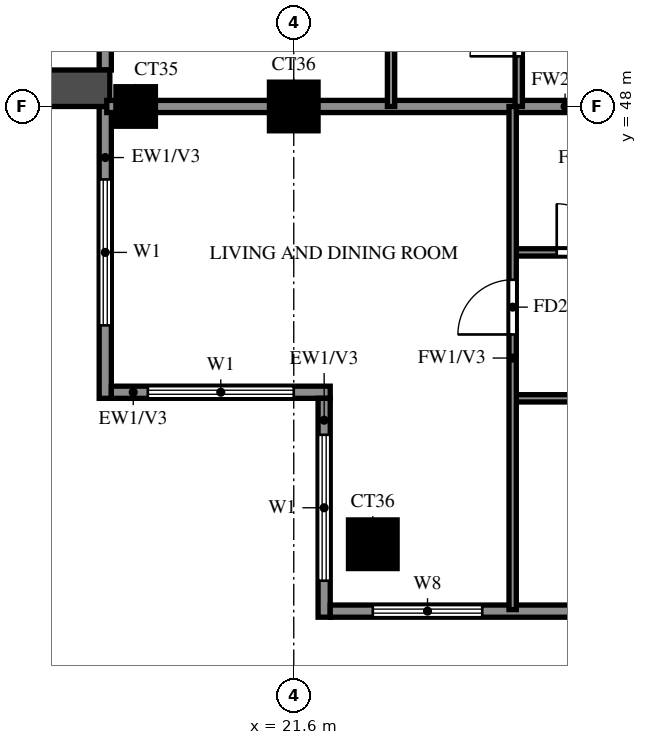
"""IFC4 building model, lengths in metres.
Left out: names, types, materials, properties, quantities, classifications, styles, units other than length and angle.
Written with IfcOpenShell. Run it as: python <this file> out.ifc"""

import sys

from ifc_helpers import new_model, si_unit, direction, frame, frame_2d, origin, origin_2d, place, context, subcontext, project, spatial, rectangle, extrude, source, transform, mapped, element, fill, save


model = new_model("IFC4")
c1 = context("Model", 3, precision=1e-05, world=origin(), true_north=direction((0.0, 1.0)))
c2 = subcontext(c1, "Body", "Model", "MODEL_VIEW")
j1 = project(units=[si_unit("LENGTHUNIT", "METRE"), si_unit("PLANEANGLEUNIT", "RADIAN")], contexts=[c1])
p1 = place(None, origin())
s1 = spatial("IfcSite", under=j1, at=p1, CompositionType="ELEMENT")
p2 = place(p1, origin())
s2 = spatial("IfcBuilding", under=s1, at=p2, CompositionType="ELEMENT")
p3 = place(p2, frame((0.0, 0.0, 246.5)))
s3 = spatial("IfcBuildingStorey", under=s2, at=p3, CompositionType="ELEMENT", Elevation=246.5)
m1 = source(origin(), c2, "Body", "SweptSolid", [
    extrude(rectangle(XDim=0.8, YDim=0.8, at=origin_2d()), origin(), (0.0, 0.0, 1.0), 3.22),
])
p4 = place(p3, frame((22.9, 40.8, 0.0), z_axis=(0.0, 0.0, 1.0), x_axis=(1.0, 0.0, 0.0)))
e1 = element("IfcColumn", 1, at=p4, inside=s3, PredefinedType="COLUMN", context=c2, shape_type="MappedRepresentation", body=[
    mapped(m1, transform((0.0, 0.0, 0.0))),
])
m2 = source(origin(), c2, "Body", "SweptSolid", [
    extrude(rectangle(XDim=0.65, YDim=0.65, at=origin_2d()), origin(), (0.0, 0.0, 1.0), 3.22),
])
p5 = place(p3, frame((19.0, 48.0, 0.0), z_axis=(0.0, 0.0, 1.0), x_axis=(1.0, 0.0, 0.0)))
e2 = element("IfcColumn", 2, at=p5, inside=s3, PredefinedType="COLUMN", context=c2, shape_type="MappedRepresentation", body=[
    mapped(m2, transform((0.0, 0.0, 0.0))),
])
p6 = place(p3, frame((21.6, 48.0, 0.0), z_axis=(0.0, 0.0, 1.0), x_axis=(1.0, 0.0, 0.0)))
e3 = element("IfcColumn", 3, at=p6, inside=s3, PredefinedType="COLUMN", context=c2, shape_type="MappedRepresentation", body=[
    mapped(m1, transform((0.0, 0.0, 0.0))),
])
p7 = place(p3, frame((18.5, 54.6, 0.0), z_axis=(0.0, 0.0, 1.0), x_axis=(0.0, -1.0, 0.0)))
e4 = element("IfcWall", 4, at=p7, inside=s3, PredefinedType="SOLIDWALL", context=c2, shape_type="SweptSolid", body=[
    extrude(rectangle(XDim=6.0, YDim=0.2, at=frame_2d((3.0, 0.0))), origin(), (0.0, 0.0, 1.0), 3.22),
])
p8 = place(p7, frame((0.9, 0.0, 0.0)))
e5 = element("IfcOpeningElement", 5, at=p8, cuts=e4, PredefinedType="OPENING", context=c2, shape_type="SweptSolid", body=[
    extrude(rectangle(XDim=1.8, YDim=2.4, at=frame_2d((0.9, 1.2))), frame((0.0, 0.11, 0.0), z_axis=(0.0, -1.0, 0.0), x_axis=(1.0, 0.0, 0.0)), (0.0, 0.0, 1.0), 0.22),
])
p9 = place(p7, frame((3.5, 0.0, 0.6)))
e6 = element("IfcOpeningElement", 6, at=p9, cuts=e4, PredefinedType="OPENING", context=c2, shape_type="SweptSolid", body=[
    extrude(rectangle(XDim=1.8, YDim=2.4, at=frame_2d((0.9, 1.2))), frame((0.0, 0.11, 0.0), z_axis=(0.0, -1.0, 0.0), x_axis=(1.0, 0.0, 0.0)), (0.0, 0.0, 1.0), 0.22),
])
p10 = place(p3, frame((18.5, 48.0, 0.0), z_axis=(0.0, 0.0, 1.0), x_axis=(0.0, -1.0, 0.0)))
e7 = element("IfcWall", 7, at=p10, inside=s3, PredefinedType="SOLIDWALL", context=c2, shape_type="SweptSolid", body=[
    extrude(rectangle(XDim=4.8, YDim=0.2, at=frame_2d((2.4, 0.0))), origin(), (0.0, 0.0, 1.0), 3.22),
])
p11 = place(p10, frame((1.2, 0.0, 0.6)))
e8 = element("IfcOpeningElement", 8, at=p11, cuts=e7, PredefinedType="OPENING", context=c2, shape_type="SweptSolid", body=[
    extrude(rectangle(XDim=2.4, YDim=2.4, at=frame_2d((1.2, 1.2))), frame((0.0, 0.11, 0.0), z_axis=(0.0, -1.0, 0.0), x_axis=(1.0, 0.0, 0.0)), (0.0, 0.0, 1.0), 0.22),
])
p12 = place(p3, frame((18.6, 43.3, 0.0), z_axis=(0.0, 0.0, 1.0), x_axis=(1.0, 0.0, 0.0)))
e9 = element("IfcWall", 9, at=p12, inside=s3, PredefinedType="SOLIDWALL", context=c2, shape_type="SweptSolid", body=[
    extrude(rectangle(XDim=3.6, YDim=0.2, at=frame_2d((1.8, 0.0))), origin(), (0.0, 0.0, 1.0), 3.22),
])
p13 = place(p12, frame((0.6, 0.0, 0.6)))
e10 = element("IfcOpeningElement", 10, at=p13, cuts=e9, PredefinedType="OPENING", context=c2, shape_type="SweptSolid", body=[
    extrude(rectangle(XDim=2.4, YDim=2.4, at=frame_2d((1.2, 1.2))), frame((0.0, 0.11, 0.0), z_axis=(0.0, -1.0, 0.0), x_axis=(1.0, 0.0, 0.0)), (0.0, 0.0, 1.0), 0.22),
])
p14 = place(p3, frame((22.1, 43.2, 0.0), z_axis=(0.0, 0.0, 1.0), x_axis=(0.0, -1.0, 0.0)))
e11 = element("IfcWall", 11, at=p14, inside=s3, PredefinedType="SOLIDWALL", context=c2, shape_type="SweptSolid", body=[
    extrude(rectangle(XDim=3.6, YDim=0.2, at=frame_2d((1.8, 0.0))), origin(), (0.0, 0.0, 1.0), 3.22),
])
p15 = place(p14, frame((0.6, 0.0, 0.6)))
e12 = element("IfcOpeningElement", 12, at=p15, cuts=e11, PredefinedType="OPENING", context=c2, shape_type="SweptSolid", body=[
    extrude(rectangle(XDim=2.4, YDim=2.4, at=frame_2d((1.2, 1.2))), frame((0.0, 0.11, 0.0), z_axis=(0.0, -1.0, 0.0), x_axis=(1.0, 0.0, 0.0)), (0.0, 0.0, 1.0), 0.22),
])
p16 = place(p3, frame((22.2, 39.7, 0.0), z_axis=(0.0, 0.0, 1.0), x_axis=(1.0, 0.0, 0.0)))
e13 = element("IfcWall", 13, at=p16, inside=s3, PredefinedType="SOLIDWALL", context=c2, shape_type="SweptSolid", body=[
    extrude(rectangle(XDim=19.8, YDim=0.2, at=frame_2d((9.9, 0.0))), origin(), (0.0, 0.0, 1.0), 3.22),
])
p17 = place(p16, frame((9.3, 0.0, 0.0)))
e14 = element("IfcOpeningElement", 14, at=p17, cuts=e13, PredefinedType="OPENING", context=c2, shape_type="SweptSolid", body=[
    extrude(rectangle(XDim=1.8, YDim=2.4, at=frame_2d((0.9, 1.2))), frame((0.0, 0.11, 0.0), z_axis=(0.0, -1.0, 0.0), x_axis=(1.0, 0.0, 0.0)), (0.0, 0.0, 1.0), 0.22),
])
p18 = place(p16, frame((0.7, 0.0, 0.6)))
e15 = element("IfcOpeningElement", 15, at=p18, cuts=e13, PredefinedType="OPENING", context=c2, shape_type="SweptSolid", body=[
    extrude(rectangle(XDim=1.8, YDim=2.4, at=frame_2d((0.9, 1.2))), frame((0.0, 0.11, 0.0), z_axis=(0.0, -1.0, 0.0), x_axis=(1.0, 0.0, 0.0)), (0.0, 0.0, 1.0), 0.22),
])
p19 = place(p16, frame((6.9, 0.0, 0.6)))
e16 = element("IfcOpeningElement", 16, at=p19, cuts=e13, PredefinedType="OPENING", context=c2, shape_type="SweptSolid", body=[
    extrude(rectangle(XDim=1.8, YDim=2.4, at=frame_2d((0.9, 1.2))), frame((0.0, 0.11, 0.0), z_axis=(0.0, -1.0, 0.0), x_axis=(1.0, 0.0, 0.0)), (0.0, 0.0, 1.0), 0.22),
])
p20 = place(p16, frame((4.35, 0.0, 1.5)))
e17 = element("IfcOpeningElement", 17, at=p20, cuts=e13, PredefinedType="OPENING", context=c2, shape_type="SweptSolid", body=[
    extrude(rectangle(XDim=0.9, YDim=0.9, at=frame_2d((0.45, 0.45))), frame((0.0, 0.11, 0.0), z_axis=(0.0, -1.0, 0.0), x_axis=(1.0, 0.0, 0.0)), (0.0, 0.0, 1.0), 0.22),
])
p21 = place(p3, frame((18.575, 48.3, 0.0), z_axis=(0.0, 0.0, 1.0), x_axis=(-1.0, 0.0, 0.0)))
e18 = element("IfcWall", 18, at=p21, inside=s3, PredefinedType="SOLIDWALL", context=c2, shape_type="SweptSolid", body=[
    extrude(rectangle(XDim=2.875, YDim=0.6, at=frame_2d((1.438, 0.0))), origin(), (0.0, 0.0, 1.0), 2.85),
])
p22 = place(p3, frame((18.525, 48.0, 0.0), z_axis=(0.0, 0.0, 1.0), x_axis=(1.0, 0.0, 0.0)))
e19 = element("IfcWall", 19, at=p22, inside=s3, PredefinedType="SOLIDWALL", context=c2, shape_type="SweptSolid", body=[
    extrude(rectangle(XDim=15.075, YDim=0.2, at=frame_2d((7.538, 0.0))), origin(), (0.0, 0.0, 1.0), 3.22),
])
p23 = place(p3, frame((25.2, 43.2, 0.0), z_axis=(0.0, 0.0, 1.0), x_axis=(1.0, 0.0, 0.0)))
e20 = element("IfcWall", 20, at=p23, inside=s3, PredefinedType="PARTITIONING", context=c2, shape_type="SweptSolid", body=[
    extrude(rectangle(XDim=3.6, YDim=0.12, at=frame_2d((1.8, 0.0))), origin(), (0.0, 0.0, 1.0), 3.22),
])
p24 = place(p3, frame((25.2, 45.6, 0.0), z_axis=(0.0, 0.0, 1.0), x_axis=(1.0, 0.0, 0.0)))
e21 = element("IfcWall", 21, at=p24, inside=s3, PredefinedType="PARTITIONING", context=c2, shape_type="SweptSolid", body=[
    extrude(rectangle(XDim=6.0, YDim=0.12, at=frame_2d((3.0, 0.0))), origin(), (0.0, 0.0, 1.0), 3.22),
])
p25 = place(p24, frame((0.725, 0.0, 0.0)))
e22 = element("IfcOpeningElement", 22, at=p25, cuts=e21, PredefinedType="OPENING", context=c2, shape_type="SweptSolid", body=[
    extrude(rectangle(XDim=0.8, YDim=2.1, at=frame_2d((0.4, 1.05))), frame((0.0, 0.07, 0.0), z_axis=(0.0, -1.0, 0.0), x_axis=(1.0, 0.0, 0.0)), (0.0, 0.0, 1.0), 0.14),
])
p26 = place(p24, frame((3.675, 0.0, 0.0)))
e23 = element("IfcOpeningElement", 23, at=p26, cuts=e21, PredefinedType="OPENING", context=c2, shape_type="SweptSolid", body=[
    extrude(rectangle(XDim=0.9, YDim=2.1, at=frame_2d((0.45, 1.05))), frame((0.0, 0.07, 0.0), z_axis=(0.0, -1.0, 0.0), x_axis=(1.0, 0.0, 0.0)), (0.0, 0.0, 1.0), 0.14),
])
p27 = place(p3, frame((23.2, 48.0, 0.0), z_axis=(0.0, 0.0, 1.0), x_axis=(0.0, 1.0, 0.0)))
e24 = element("IfcWall", 24, at=p27, inside=s3, PredefinedType="PARTITIONING", context=c2, shape_type="SweptSolid", body=[
    extrude(rectangle(XDim=21.6, YDim=0.12, at=frame_2d((10.8, 0.0))), origin(), (0.0, 0.0, 1.0), 3.22),
])
p28 = place(p27, frame((1.35, 0.0, 0.0)))
e25 = element("IfcOpeningElement", 25, at=p28, cuts=e24, PredefinedType="OPENING", context=c2, shape_type="SweptSolid", body=[
    extrude(rectangle(XDim=0.9, YDim=2.1, at=frame_2d((0.45, 1.05))), frame((0.0, 0.07, 0.0), z_axis=(0.0, -1.0, 0.0), x_axis=(1.0, 0.0, 0.0)), (0.0, 0.0, 1.0), 0.14),
])
p29 = place(p27, frame((7.95, 0.0, 0.0)))
e26 = element("IfcOpeningElement", 26, at=p29, cuts=e24, PredefinedType="OPENING", context=c2, shape_type="SweptSolid", body=[
    extrude(rectangle(XDim=1.5, YDim=2.1, at=frame_2d((0.75, 1.05))), frame((0.0, 0.07, 0.0), z_axis=(0.0, -1.0, 0.0), x_axis=(1.0, 0.0, 0.0)), (0.0, 0.0, 1.0), 0.14),
])
p30 = place(p27, frame((12.15, 0.0, 0.0)))
e27 = element("IfcOpeningElement", 27, at=p30, cuts=e24, PredefinedType="OPENING", context=c2, shape_type="SweptSolid", body=[
    extrude(rectangle(XDim=0.9, YDim=2.1, at=frame_2d((0.45, 1.05))), frame((0.0, 0.07, 0.0), z_axis=(0.0, -1.0, 0.0), x_axis=(1.0, 0.0, 0.0)), (0.0, 0.0, 1.0), 0.14),
])
p31 = place(p27, frame((15.75, 0.0, 0.0)))
e28 = element("IfcOpeningElement", 28, at=p31, cuts=e24, PredefinedType="OPENING", context=c2, shape_type="SweptSolid", body=[
    extrude(rectangle(XDim=0.9, YDim=2.1, at=frame_2d((0.45, 1.05))), frame((0.0, 0.07, 0.0), z_axis=(0.0, -1.0, 0.0), x_axis=(1.0, 0.0, 0.0)), (0.0, 0.0, 1.0), 0.14),
])
p32 = place(p27, frame((19.35, 0.0, 0.0)))
e29 = element("IfcOpeningElement", 29, at=p32, cuts=e24, PredefinedType="OPENING", context=c2, shape_type="SweptSolid", body=[
    extrude(rectangle(XDim=0.9, YDim=2.1, at=frame_2d((0.45, 1.05))), frame((0.0, 0.07, 0.0), z_axis=(0.0, -1.0, 0.0), x_axis=(1.0, 0.0, 0.0)), (0.0, 0.0, 1.0), 0.14),
])
p33 = place(p3, frame((25.2, 39.725, 0.0), z_axis=(0.0, 0.0, 1.0), x_axis=(0.0, 1.0, 0.0)))
e30 = element("IfcWall", 30, at=p33, inside=s3, PredefinedType="PARTITIONING", context=c2, shape_type="SweptSolid", body=[
    extrude(rectangle(XDim=8.275, YDim=0.12, at=frame_2d((4.137, 0.0))), origin(), (0.0, 0.0, 1.0), 3.22),
])
p34 = place(p33, frame((4.525, 0.0, 0.0)))
e31 = element("IfcOpeningElement", 31, at=p34, cuts=e30, PredefinedType="OPENING", context=c2, shape_type="SweptSolid", body=[
    extrude(rectangle(XDim=0.9, YDim=2.1, at=frame_2d((0.45, 1.05))), frame((0.0, 0.07, 0.0), z_axis=(0.0, -1.0, 0.0), x_axis=(1.0, 0.0, 0.0)), (0.0, 0.0, 1.0), 0.14),
])
p35 = place(p3, frame((25.3, 48.0, 0.0), z_axis=(0.0, 0.0, 1.0), x_axis=(0.0, 1.0, 0.0)))
e32 = element("IfcWall", 32, at=p35, inside=s3, PredefinedType="PARTITIONING", context=c2, shape_type="SweptSolid", body=[
    extrude(rectangle(XDim=5.2, YDim=0.12, at=frame_2d((2.6, 0.0))), origin(), (0.0, 0.0, 1.0), 3.22),
])
p36 = place(p35, frame((0.825, 0.0, 0.0)))
e33 = element("IfcOpeningElement", 33, at=p36, cuts=e32, PredefinedType="OPENING", context=c2, shape_type="SweptSolid", body=[
    extrude(rectangle(XDim=0.8, YDim=2.1, at=frame_2d((0.4, 1.05))), frame((0.0, 0.07, 0.0), z_axis=(0.0, -1.0, 0.0), x_axis=(1.0, 0.0, 0.0)), (0.0, 0.0, 1.0), 0.14),
])
p37 = place(p11, origin())
e34 = element("IfcWindow", 34, at=p37, inside=s3, PartitioningType="DOUBLE_PANEL_VERTICAL", PredefinedType="WINDOW", context=c2, shape_type="SweptSolid", body=[
    extrude(rectangle(XDim=2.4, YDim=2.4, at=frame_2d((1.2, 1.2))), frame((0.0, 0.03, 0.0), z_axis=(0.0, -1.0, 0.0), x_axis=(1.0, 0.0, 0.0)), (0.0, 0.0, 1.0), 0.06),
])
fill(e8, e34)
p38 = place(p13, origin())
e35 = element("IfcWindow", 35, at=p38, inside=s3, PartitioningType="DOUBLE_PANEL_VERTICAL", PredefinedType="WINDOW", context=c2, shape_type="SweptSolid", body=[
    extrude(rectangle(XDim=2.4, YDim=2.4, at=frame_2d((1.2, 1.2))), frame((0.0, 0.03, 0.0), z_axis=(0.0, -1.0, 0.0), x_axis=(1.0, 0.0, 0.0)), (0.0, 0.0, 1.0), 0.06),
])
fill(e10, e35)
p39 = place(p15, origin())
e36 = element("IfcWindow", 36, at=p39, inside=s3, PartitioningType="DOUBLE_PANEL_VERTICAL", PredefinedType="WINDOW", context=c2, shape_type="SweptSolid", body=[
    extrude(rectangle(XDim=2.4, YDim=2.4, at=frame_2d((1.2, 1.2))), frame((0.0, 0.03, 0.0), z_axis=(0.0, -1.0, 0.0), x_axis=(1.0, 0.0, 0.0)), (0.0, 0.0, 1.0), 0.06),
])
fill(e12, e36)
p40 = place(p18, origin())
e37 = element("IfcWindow", 37, at=p40, inside=s3, PartitioningType="DOUBLE_PANEL_VERTICAL", PredefinedType="WINDOW", context=c2, shape_type="SweptSolid", body=[
    extrude(rectangle(XDim=1.8, YDim=2.4, at=frame_2d((0.9, 1.2))), frame((0.0, 0.03, 0.0), z_axis=(0.0, -1.0, 0.0), x_axis=(1.0, 0.0, 0.0)), (0.0, 0.0, 1.0), 0.06),
])
fill(e15, e37)
p41 = place(p34, origin())
e38 = element("IfcDoor", 38, at=p41, inside=s3, OperationType="SINGLE_SWING_LEFT", PredefinedType="DOOR", context=c2, shape_type="SweptSolid", body=[
    extrude(rectangle(XDim=0.9, YDim=2.1, at=frame_2d((0.45, 1.05))), frame((0.0, 0.025, 0.0), z_axis=(0.0, -1.0, 0.0), x_axis=(1.0, 0.0, 0.0)), (0.0, 0.0, 1.0), 0.05),
])
fill(e31, e38)
p42 = place(p25, origin())
e39 = element("IfcDoor", 39, at=p42, inside=s3, OperationType="SINGLE_SWING_LEFT", PredefinedType="DOOR", context=c2, shape_type="SweptSolid", body=[
    extrude(rectangle(XDim=0.8, YDim=2.1, at=frame_2d((0.4, 1.05))), frame((0.0, 0.025, 0.0), z_axis=(0.0, -1.0, 0.0), x_axis=(1.0, 0.0, 0.0)), (0.0, 0.0, 1.0), 0.05),
])
fill(e22, e39)
p43 = place(p36, origin())
e40 = element("IfcDoor", 40, at=p43, inside=s3, OperationType="SINGLE_SWING_LEFT", PredefinedType="DOOR", context=c2, shape_type="SweptSolid", body=[
    extrude(rectangle(XDim=0.8, YDim=2.1, at=frame_2d((0.4, 1.05))), frame((0.0, 0.025, 0.0), z_axis=(0.0, -1.0, 0.0), x_axis=(1.0, 0.0, 0.0)), (0.0, 0.0, 1.0), 0.05),
])
fill(e33, e40)
save(model, sys.argv[1])
